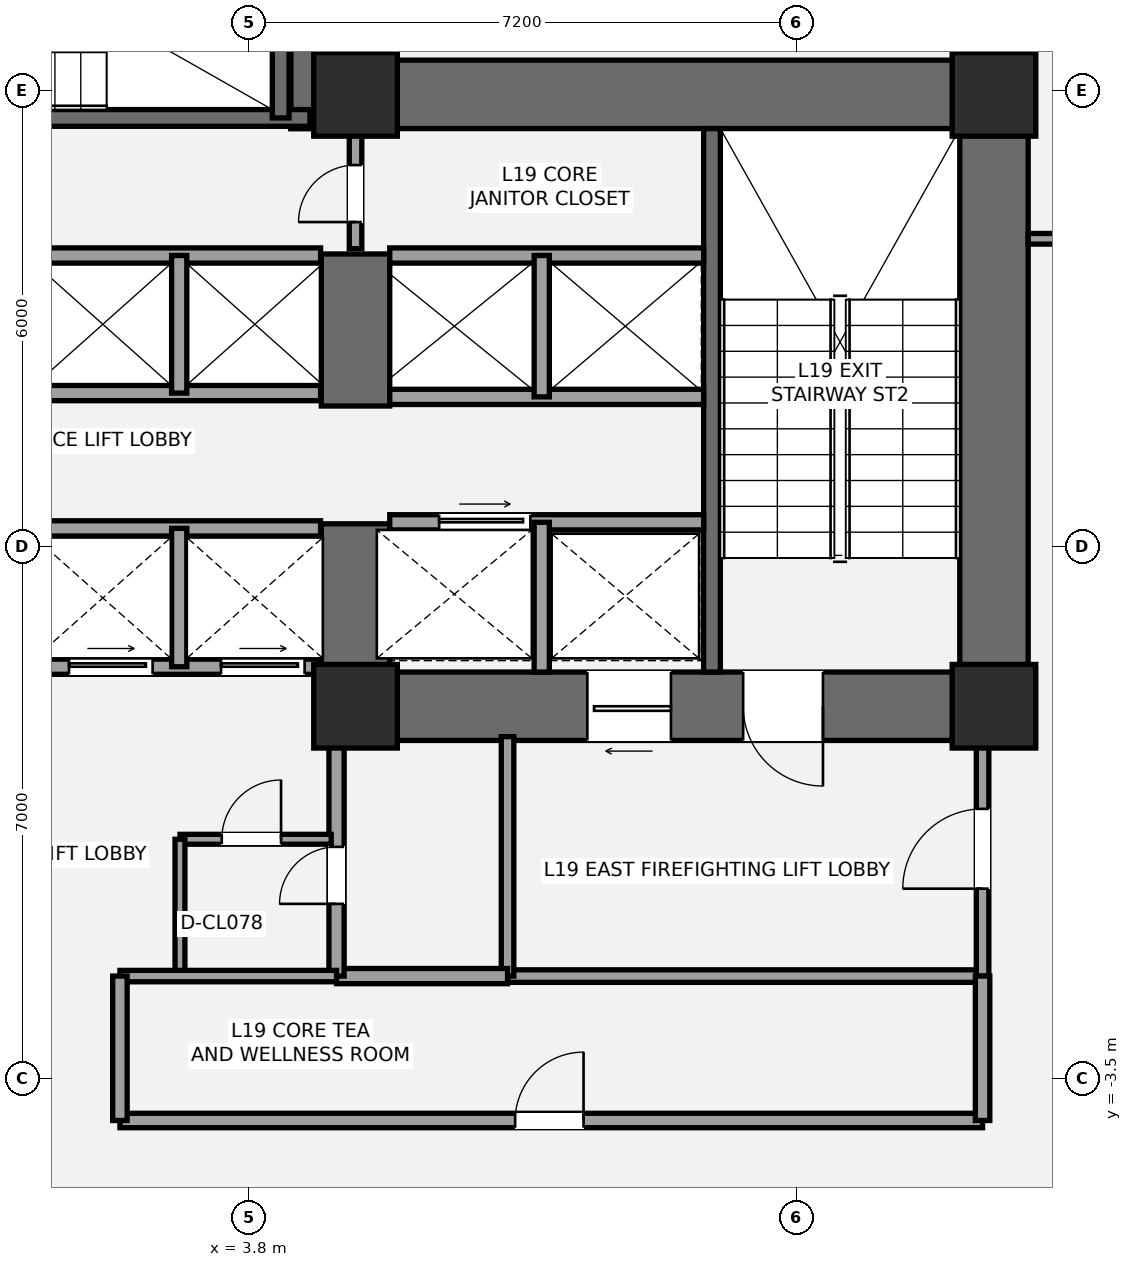
"""IFC4 building model, lengths in metres.
Left out: names, types, materials, properties, quantities, classifications, styles, units other than length and angle.
Written with IfcOpenShell. Run it as: python <this file> out.ifc"""

import sys

from ifc_helpers import new_model, si_unit, direction, frame, frame_2d, origin, origin_2d, place, context, subcontext, project, spatial, rectangle, extrude, element, fill, save


model = new_model("IFC4")
c1 = context("Model", 3, precision=1e-05, world=origin(), true_north=direction((0.0, 1.0)))
c2 = subcontext(c1, "Body", "Model", "MODEL_VIEW")
j1 = project(units=[si_unit("LENGTHUNIT", "METRE"), si_unit("PLANEANGLEUNIT", "RADIAN")], contexts=[c1])
p1 = place(None, origin())
s1 = spatial("IfcSite", under=j1, at=p1, CompositionType="ELEMENT")
p2 = place(p1, origin())
s2 = spatial("IfcBuilding", under=s1, at=p2, CompositionType="ELEMENT")
p3 = place(p2, frame((0.0, 0.0, 73.8)))
s3 = spatial("IfcBuildingStorey", under=s2, at=p3, CompositionType="ELEMENT", Elevation=73.8)
p4 = place(p3, frame((13.6, 0.95, 0.0), z_axis=(0.0, 0.0, 1.0), x_axis=(0.0, 1.0, 0.0)))
e1 = element("IfcWall", 1, at=p4, inside=s3, PredefinedType="SHEAR", context=c2, shape_type="SweptSolid", body=[
    extrude(rectangle(XDim=8.95, YDim=0.9, at=frame_2d((4.475, 0.0))), origin(), (0.0, 0.0, 1.0), 3.6),
])
p5 = place(p3, frame((4.35, 9.45, 0.0), z_axis=(0.0, 0.0, 1.0), x_axis=(1.0, 0.0, 0.0)))
e2 = element("IfcWall", 2, at=p5, inside=s3, PredefinedType="SHEAR", context=c2, shape_type="SweptSolid", body=[
    extrude(rectangle(XDim=9.7, YDim=0.9, at=frame_2d((4.85, 0.0))), origin(), (0.0, 0.0, 1.0), 3.6),
])
p6 = place(p3, frame((14.05, 1.4, 0.0), z_axis=(0.0, 0.0, 1.0), x_axis=(-1.0, 0.0, 0.0)))
e3 = element("IfcWall", 3, at=p6, inside=s3, PredefinedType="SHEAR", context=c2, shape_type="SweptSolid", body=[
    extrude(rectangle(XDim=9.3, YDim=0.9, at=frame_2d((4.65, 0.0))), origin(), (0.0, 0.0, 1.0), 3.6),
])
p7 = place(p6, frame((2.7, 0.0, 0.0)))
e4 = element("IfcOpeningElement", 4, at=p7, cuts=e3, PredefinedType="OPENING", context=c2, shape_type="SweptSolid", body=[
    extrude(rectangle(XDim=1.05, YDim=2.15, at=frame_2d((0.525, 1.075))), frame((0.0, 0.46, 0.0), z_axis=(0.0, -1.0, 0.0), x_axis=(1.0, 0.0, 0.0)), (0.0, 0.0, 1.0), 0.92),
])
p8 = place(p6, frame((4.7, 0.0, 0.0)))
e5 = element("IfcOpeningElement", 5, at=p8, cuts=e3, PredefinedType="OPENING", context=c2, shape_type="SweptSolid", body=[
    extrude(rectangle(XDim=1.1, YDim=2.2, at=frame_2d((0.55, 1.1))), frame((0.0, 0.46, 0.0), z_axis=(0.0, -1.0, 0.0), x_axis=(1.0, 0.0, 0.0)), (0.0, 0.0, 1.0), 0.92),
])
p9 = place(p3, frame((5.2, 0.95, 0.0), z_axis=(0.0, 0.0, 1.0), x_axis=(0.0, 1.0, 0.0)))
e6 = element("IfcWall", 6, at=p9, inside=s3, PredefinedType="SHEAR", context=c2, shape_type="SweptSolid", body=[
    extrude(rectangle(XDim=2.85, YDim=0.9, at=frame_2d((1.425, 0.0))), origin(), (0.0, 0.0, 1.0), 3.6),
])
p10 = place(p3, frame((5.2, 5.35, 0.0), z_axis=(0.0, 0.0, 1.0), x_axis=(0.0, 1.0, 0.0)))
e7 = element("IfcWall", 7, at=p10, inside=s3, PredefinedType="SHEAR", context=c2, shape_type="SweptSolid", body=[
    extrude(rectangle(XDim=2.0, YDim=0.9, at=frame_2d((1.0, 0.0))), origin(), (0.0, 0.0, 1.0), 3.6),
])
p11 = place(p3, frame((9.89, 1.85, 0.0), z_axis=(0.0, 0.0, 1.0), x_axis=(0.0, 1.0, 0.0)))
e8 = element("IfcWall", 8, at=p11, inside=s3, PredefinedType="SHEAR", context=c2, shape_type="SweptSolid", body=[
    extrude(rectangle(XDim=7.15, YDim=0.22, at=frame_2d((3.575, 0.0))), origin(), (0.0, 0.0, 1.0), 3.6),
])
p12 = place(p3, frame((4.8, 9.0, 0.0), z_axis=(0.0, 0.0, 1.0), x_axis=(0.0, 1.0, 0.0)))
e9 = element("IfcWall", 9, at=p12, inside=s3, PredefinedType="SHEAR", context=c2, shape_type="SweptSolid", body=[
    extrude(rectangle(XDim=4.3, YDim=0.9, at=frame_2d((2.15, 0.0))), origin(), (0.0, 0.0, 1.0), 3.6),
])
p13 = place(p3, frame((-4.7, 9.14, 0.0), z_axis=(0.0, 0.0, 1.0), x_axis=(1.0, 0.0, 0.0)))
e10 = element("IfcWall", 10, at=p13, inside=s3, PredefinedType="SHEAR", context=c2, shape_type="SweptSolid", body=[
    extrude(rectangle(XDim=9.3, YDim=0.22, at=frame_2d((4.65, 0.0))), origin(), (0.0, 0.0, 1.0), 3.6),
])
p14 = place(p13, frame((1.15, 0.0, 0.0)))
e11 = element("IfcOpeningElement", 11, at=p14, cuts=e10, PredefinedType="OPENING", context=c2, shape_type="SweptSolid", body=[
    extrude(rectangle(XDim=1.05, YDim=2.15, at=frame_2d((0.525, 1.075))), frame((0.0, 0.12, 0.0), z_axis=(0.0, -1.0, 0.0), x_axis=(1.0, 0.0, 0.0)), (0.0, 0.0, 1.0), 0.24),
])
p15 = place(p3, frame((4.215, 9.14, 0.0), z_axis=(0.0, 0.0, 1.0), x_axis=(0.0, 1.0, 0.0)))
e12 = element("IfcWall", 12, at=p15, inside=s3, PredefinedType="SHEAR", context=c2, shape_type="SweptSolid", body=[
    extrude(rectangle(XDim=3.26, YDim=0.22, at=frame_2d((1.63, 0.0))), origin(), (0.0, 0.0, 1.0), 3.6),
])
for number, where, z_axis, x_axis in (
    (13, (5.2, 1.4, 0.0), (0.0, 0.0, 1.0), (1.0, 0.0, 0.0)),
    (14, (5.2, 9.45, 0.0), (0.0, 0.0, 1.0), (1.0, 0.0, 0.0)),
    (15, (13.6, 1.4, 0.0), (0.0, 0.0, 1.0), (1.0, 0.0, 0.0)),
    (16, (13.6, 9.45, 0.0), (0.0, 0.0, 1.0), (1.0, 0.0, 0.0)),
):
    element("IfcColumn", number, at=place(p3, frame(where, z_axis=z_axis, x_axis=x_axis)), inside=s3, PredefinedType="COLUMN", context=c2, shape_type="SweptSolid", body=[
        extrude(rectangle(XDim=1.1, YDim=1.1, at=origin_2d()), origin(), (0.0, 0.0, 1.0), 3.6),
    ])
p16 = place(p3, frame((7.2, -2.15, 0.0), z_axis=(0.0, 0.0, 1.0), x_axis=(1.0, 0.0, 0.0)))
e17 = element("IfcWall", 17, at=p16, inside=s3, PredefinedType="PARTITIONING", context=c2, shape_type="SweptSolid", body=[
    extrude(rectangle(XDim=6.25, YDim=0.165, at=frame_2d((3.125, 0.0))), origin(), (0.0, 0.0, 1.0), 3.36),
])
p17 = place(p3, frame((7.2, -2.15, 0.0), z_axis=(0.0, 0.0, 1.0), x_axis=(0.0, 1.0, 0.0)))
e18 = element("IfcWall", 18, at=p17, inside=s3, PredefinedType="PARTITIONING", context=c2, shape_type="SweptSolid", body=[
    extrude(rectangle(XDim=3.15, YDim=0.165, at=frame_2d((1.575, 0.0))), origin(), (0.0, 0.0, 1.0), 3.36),
])
p18 = place(p3, frame((13.45, -2.15, 0.0), z_axis=(0.0, 0.0, 1.0), x_axis=(0.0, 1.0, 0.0)))
e19 = element("IfcWall", 19, at=p18, inside=s3, PredefinedType="PARTITIONING", context=c2, shape_type="SweptSolid", body=[
    extrude(rectangle(XDim=3.15, YDim=0.165, at=frame_2d((1.575, 0.0))), origin(), (0.0, 0.0, 1.0), 2.813),
])
p19 = place(p18, frame((1.15, 0.0, 0.0)))
e20 = element("IfcOpeningElement", 20, at=p19, cuts=e19, PredefinedType="OPENING", context=c2, shape_type="SweptSolid", body=[
    extrude(rectangle(XDim=1.05, YDim=2.15, at=frame_2d((0.525, 1.075))), frame((0.0, 0.093, 0.0), z_axis=(0.0, -1.0, 0.0), x_axis=(1.0, 0.0, 0.0)), (0.0, 0.0, 1.0), 0.185),
])
p20 = place(p3, frame((4.95, -2.15, 0.0), z_axis=(0.0, 0.0, 1.0), x_axis=(1.0, 0.0, 0.0)))
e21 = element("IfcWall", 21, at=p20, inside=s3, PredefinedType="SOLIDWALL", context=c2, shape_type="SweptSolid", body=[
    extrude(rectangle(XDim=2.25, YDim=0.2, at=frame_2d((1.125, 0.0))), origin(), (0.0, 0.0, 1.0), 3.36),
])
p21 = place(p3, frame((4.95, -2.15, 0.0), z_axis=(0.0, 0.0, 1.0), x_axis=(0.0, 1.0, 0.0)))
e22 = element("IfcWall", 22, at=p21, inside=s3, PredefinedType="SOLIDWALL", context=c2, shape_type="SweptSolid", body=[
    extrude(rectangle(XDim=3.15, YDim=0.2, at=frame_2d((1.575, 0.0))), origin(), (0.0, 0.0, 1.0), 2.813),
])
p22 = place(p21, frame((0.95, 0.0, 0.0)))
e23 = element("IfcOpeningElement", 23, at=p22, cuts=e22, PredefinedType="OPENING", context=c2, shape_type="SweptSolid", body=[
    extrude(rectangle(XDim=0.75, YDim=2.1, at=frame_2d((0.375, 1.05))), frame((0.0, 0.11, 0.0), z_axis=(0.0, -1.0, 0.0), x_axis=(1.0, 0.0, 0.0)), (0.0, 0.0, 1.0), 0.22),
])
p23 = place(p3, frame((2.89, -0.35, 0.0), z_axis=(0.0, 0.0, 1.0), x_axis=(1.0, 0.0, 0.0)))
e24 = element("IfcWall", 24, at=p23, inside=s3, PredefinedType="PARTITIONING", context=c2, shape_type="SweptSolid", body=[
    extrude(rectangle(XDim=1.99, YDim=0.13, at=frame_2d((0.995, 0.0))), origin(), (0.0, 0.0, 1.0), 3.36),
])
p24 = place(p23, frame((0.55, 0.0, 0.0)))
e25 = element("IfcOpeningElement", 25, at=p24, cuts=e24, PredefinedType="OPENING", context=c2, shape_type="SweptSolid", body=[
    extrude(rectangle(XDim=0.78, YDim=2.1, at=frame_2d((0.39, 1.05))), frame((0.0, 0.075, 0.0), z_axis=(0.0, -1.0, 0.0), x_axis=(1.0, 0.0, 0.0)), (0.0, 0.0, 1.0), 0.15),
])
p25 = place(p3, frame((2.89, -2.15, 0.0), z_axis=(0.0, 0.0, 1.0), x_axis=(0.0, 1.0, 0.0)))
e26 = element("IfcWall", 26, at=p25, inside=s3, PredefinedType="PARTITIONING", context=c2, shape_type="SweptSolid", body=[
    extrude(rectangle(XDim=1.8, YDim=0.13, at=frame_2d((0.9, 0.0))), origin(), (0.0, 0.0, 1.0), 3.36),
])
p26 = place(p3, frame((5.65, 3.82, 0.0), z_axis=(0.0, 0.0, 1.0), x_axis=(1.0, 0.0, 0.0)))
e27 = element("IfcWall", 27, at=p26, inside=s3, PredefinedType="SOLIDWALL", context=c2, shape_type="SweptSolid", body=[
    extrude(rectangle(XDim=4.13, YDim=0.2, at=frame_2d((2.065, 0.0))), origin(), (0.0, 0.0, 1.0), 3.36),
])
p27 = place(p26, frame((0.65, 0.0, 0.0)))
e28 = element("IfcOpeningElement", 28, at=p27, cuts=e27, PredefinedType="OPENING", context=c2, shape_type="SweptSolid", body=[
    extrude(rectangle(XDim=1.2, YDim=2.2, at=frame_2d((0.6, 1.1))), frame((0.0, 0.11, 0.0), z_axis=(0.0, -1.0, 0.0), x_axis=(1.0, 0.0, 0.0)), (0.0, 0.0, 1.0), 0.22),
])
p28 = place(p3, frame((7.65, 1.85, 0.0), z_axis=(0.0, 0.0, 1.0), x_axis=(0.0, 1.0, 0.0)))
e29 = element("IfcWall", 29, at=p28, inside=s3, PredefinedType="SOLIDWALL", context=c2, shape_type="SweptSolid", body=[
    extrude(rectangle(XDim=1.97, YDim=0.2, at=frame_2d((0.985, 0.0))), origin(), (0.0, 0.0, 1.0), 3.36),
])
for number, where, z_axis, x_axis in (
    (30, (5.65, 5.47, 0.0), (0.0, 0.0, 1.0), (1.0, 0.0, 0.0)),
    (31, (5.65, 7.33, 0.0), (0.0, 0.0, 1.0), (1.0, 0.0, 0.0)),
):
    element("IfcWall", number, at=place(p3, frame(where, z_axis=z_axis, x_axis=x_axis)), inside=s3, PredefinedType="SOLIDWALL", context=c2, shape_type="SweptSolid", body=[
        extrude(rectangle(XDim=4.13, YDim=0.2, at=frame_2d((2.065, 0.0))), origin(), (0.0, 0.0, 1.0), 3.36),
    ])
p29 = place(p3, frame((7.65, 5.47, 0.0), z_axis=(0.0, 0.0, 1.0), x_axis=(0.0, 1.0, 0.0)))
e32 = element("IfcWall", 32, at=p29, inside=s3, PredefinedType="SOLIDWALL", context=c2, shape_type="SweptSolid", body=[
    extrude(rectangle(XDim=1.86, YDim=0.2, at=frame_2d((0.93, 0.0))), origin(), (0.0, 0.0, 1.0), 3.36),
])
p30 = place(p3, frame((0.88, 1.92, 0.0), z_axis=(0.0, 0.0, 1.0), x_axis=(1.0, 0.0, 0.0)))
e33 = element("IfcWall", 33, at=p30, inside=s3, PredefinedType="SOLIDWALL", context=c2, shape_type="SweptSolid", body=[
    extrude(rectangle(XDim=3.86, YDim=0.2, at=frame_2d((1.93, 0.0))), origin(), (0.0, 0.0, 1.0), 2.35),
])
p31 = place(p30, frame((0.55, 0.0, 0.0)))
e34 = element("IfcOpeningElement", 34, at=p31, cuts=e33, PredefinedType="OPENING", context=c2, shape_type="SweptSolid", body=[
    extrude(rectangle(XDim=1.1, YDim=2.2, at=frame_2d((0.55, 1.1))), frame((0.0, 0.11, 0.0), z_axis=(0.0, -1.0, 0.0), x_axis=(1.0, 0.0, 0.0)), (0.0, 0.0, 1.0), 0.22),
])
p32 = place(p30, frame((2.55, 0.0, 0.0)))
e35 = element("IfcOpeningElement", 35, at=p32, cuts=e33, PredefinedType="OPENING", context=c2, shape_type="SweptSolid", body=[
    extrude(rectangle(XDim=1.1, YDim=2.2, at=frame_2d((0.55, 1.1))), frame((0.0, 0.11, 0.0), z_axis=(0.0, -1.0, 0.0), x_axis=(1.0, 0.0, 0.0)), (0.0, 0.0, 1.0), 0.22),
])
p33 = place(p3, frame((0.88, 3.74, 0.0), z_axis=(0.0, 0.0, 1.0), x_axis=(1.0, 0.0, 0.0)))
e36 = element("IfcWall", 36, at=p33, inside=s3, PredefinedType="SOLIDWALL", context=c2, shape_type="SweptSolid", body=[
    extrude(rectangle(XDim=3.86, YDim=0.2, at=frame_2d((1.93, 0.0))), origin(), (0.0, 0.0, 1.0), 3.36),
])
p34 = place(p3, frame((2.88, 1.92, 0.0), z_axis=(0.0, 0.0, 1.0), x_axis=(0.0, 1.0, 0.0)))
e37 = element("IfcWall", 37, at=p34, inside=s3, PredefinedType="SOLIDWALL", context=c2, shape_type="SweptSolid", body=[
    extrude(rectangle(XDim=1.82, YDim=0.2, at=frame_2d((0.91, 0.0))), origin(), (0.0, 0.0, 1.0), 3.36),
])
for number, where, z_axis, x_axis in (
    (38, (0.88, 5.52, 0.0), (0.0, 0.0, 1.0), (1.0, 0.0, 0.0)),
    (39, (0.88, 7.33, 0.0), (0.0, 0.0, 1.0), (1.0, 0.0, 0.0)),
):
    element("IfcWall", number, at=place(p3, frame(where, z_axis=z_axis, x_axis=x_axis)), inside=s3, PredefinedType="SOLIDWALL", context=c2, shape_type="SweptSolid", body=[
        extrude(rectangle(XDim=3.86, YDim=0.2, at=frame_2d((1.93, 0.0))), origin(), (0.0, 0.0, 1.0), 3.36),
    ])
p35 = place(p3, frame((2.88, 5.52, 0.0), z_axis=(0.0, 0.0, 1.0), x_axis=(0.0, 1.0, 0.0)))
e40 = element("IfcWall", 40, at=p35, inside=s3, PredefinedType="SOLIDWALL", context=c2, shape_type="SweptSolid", body=[
    extrude(rectangle(XDim=1.81, YDim=0.2, at=frame_2d((0.905, 0.0))), origin(), (0.0, 0.0, 1.0), 3.36),
])
p36 = place(p3, frame((5.2, 7.42, 0.0), z_axis=(0.0, 0.0, 1.0), x_axis=(0.0, 1.0, 0.0)))
e41 = element("IfcWall", 41, at=p36, inside=s3, PredefinedType="PARTITIONING", context=c2, shape_type="SweptSolid", body=[
    extrude(rectangle(XDim=1.58, YDim=0.165, at=frame_2d((0.79, 0.0))), origin(), (0.0, 0.0, 1.0), 3.36),
])
p37 = place(p36, frame((0.35, 0.0, 0.0)))
e42 = element("IfcOpeningElement", 42, at=p37, cuts=e41, PredefinedType="OPENING", context=c2, shape_type="SweptSolid", body=[
    extrude(rectangle(XDim=0.75, YDim=2.1, at=frame_2d((0.375, 1.05))), frame((0.0, 0.093, 0.0), z_axis=(0.0, -1.0, 0.0), x_axis=(1.0, 0.0, 0.0)), (0.0, 0.0, 1.0), 0.185),
])
p38 = place(p3, frame((2.1, -4.05, 0.0), z_axis=(0.0, 0.0, 1.0), x_axis=(1.0, 0.0, 0.0)))
e43 = element("IfcWall", 43, at=p38, inside=s3, PredefinedType="PLUMBINGWALL", context=c2, shape_type="SweptSolid", body=[
    extrude(rectangle(XDim=11.35, YDim=0.19, at=frame_2d((5.675, 0.0))), origin(), (0.0, 0.0, 1.0), 2.893),
])
p39 = place(p38, frame((5.2, 0.0, 0.0)))
e44 = element("IfcOpeningElement", 44, at=p39, cuts=e43, PredefinedType="OPENING", context=c2, shape_type="SweptSolid", body=[
    extrude(rectangle(XDim=0.9, YDim=2.1, at=frame_2d((0.45, 1.05))), frame((0.0, 0.105, 0.0), z_axis=(0.0, -1.0, 0.0), x_axis=(1.0, 0.0, 0.0)), (0.0, 0.0, 1.0), 0.21),
])
p40 = place(p3, frame((2.1, -2.15, 0.0), z_axis=(0.0, 0.0, 1.0), x_axis=(1.0, 0.0, 0.0)))
e45 = element("IfcWall", 45, at=p40, inside=s3, PredefinedType="PLUMBINGWALL", context=c2, shape_type="SweptSolid", body=[
    extrude(rectangle(XDim=2.85, YDim=0.15, at=frame_2d((1.425, 0.0))), origin(), (0.0, 0.0, 1.0), 3.36),
])
p41 = place(p3, frame((2.1, -4.05, 0.0), z_axis=(0.0, 0.0, 1.0), x_axis=(0.0, 1.0, 0.0)))
e46 = element("IfcWall", 46, at=p41, inside=s3, PredefinedType="PLUMBINGWALL", context=c2, shape_type="SweptSolid", body=[
    extrude(rectangle(XDim=1.9, YDim=0.19, at=frame_2d((0.95, 0.0))), origin(), (0.0, 0.0, 1.0), 3.36),
])
p42 = place(p3, frame((13.45, -4.05, 0.0), z_axis=(0.0, 0.0, 1.0), x_axis=(0.0, 1.0, 0.0)))
e47 = element("IfcWall", 47, at=p42, inside=s3, PredefinedType="PLUMBINGWALL", context=c2, shape_type="SweptSolid", body=[
    extrude(rectangle(XDim=1.9, YDim=0.19, at=frame_2d((0.95, 0.0))), origin(), (0.0, 0.0, 1.0), 2.813),
])
p43 = place(p3, frame((14.05, 7.55, 0.0), z_axis=(0.0, 0.0, 1.0), x_axis=(1.0, 0.0, 0.0)))
e48 = element("IfcWall", 48, at=p43, inside=s3, PredefinedType="PARTITIONING", context=c2, shape_type="SweptSolid", body=[
    extrude(rectangle(XDim=12.198, YDim=0.14, at=frame_2d((6.099, 0.0))), origin(), (0.0, 0.0, 1.0), 2.813),
])
p44 = place(p43, frame((1.2, 0.0, 0.0)))
e49 = element("IfcOpeningElement", 49, at=p44, cuts=e48, PredefinedType="OPENING", context=c2, shape_type="SweptSolid", body=[
    extrude(rectangle(XDim=0.92, YDim=2.15, at=frame_2d((0.46, 1.075))), frame((0.0, 0.08, 0.0), z_axis=(0.0, -1.0, 0.0), x_axis=(1.0, 0.0, 0.0)), (0.0, 0.0, 1.0), 0.16),
])
p45 = place(p7, origin())
e50 = element("IfcDoor", 50, at=p45, inside=s3, OperationType="SINGLE_SWING_LEFT", PredefinedType="DOOR", context=c2, shape_type="SweptSolid", body=[
    extrude(rectangle(XDim=1.05, YDim=2.15, at=frame_2d((0.525, 1.075))), frame((0.0, 0.025, 0.0), z_axis=(0.0, -1.0, 0.0), x_axis=(1.0, 0.0, 0.0)), (0.0, 0.0, 1.0), 0.05),
])
fill(e4, e50)
p46 = place(p19, origin())
e51 = element("IfcDoor", 51, at=p46, inside=s3, OperationType="SINGLE_SWING_LEFT", PredefinedType="DOOR", context=c2, shape_type="SweptSolid", body=[
    extrude(rectangle(XDim=1.05, YDim=2.15, at=frame_2d((0.525, 1.075))), frame((0.0, 0.025, 0.0), z_axis=(0.0, -1.0, 0.0), x_axis=(1.0, 0.0, 0.0)), (0.0, 0.0, 1.0), 0.05),
])
fill(e20, e51)
p47 = place(p22, origin())
e52 = element("IfcDoor", 52, at=p47, inside=s3, OperationType="SINGLE_SWING_LEFT", PredefinedType="DOOR", context=c2, shape_type="SweptSolid", body=[
    extrude(rectangle(XDim=0.75, YDim=2.1, at=frame_2d((0.375, 1.05))), frame((0.0, 0.025, 0.0), z_axis=(0.0, -1.0, 0.0), x_axis=(1.0, 0.0, 0.0)), (0.0, 0.0, 1.0), 0.05),
])
fill(e23, e52)
p48 = place(p24, origin())
e53 = element("IfcDoor", 53, at=p48, inside=s3, OperationType="SINGLE_SWING_RIGHT", PredefinedType="DOOR", context=c2, shape_type="SweptSolid", body=[
    extrude(rectangle(XDim=0.78, YDim=2.1, at=frame_2d((0.39, 1.05))), frame((0.0, 0.025, 0.0), z_axis=(0.0, -1.0, 0.0), x_axis=(1.0, 0.0, 0.0)), (0.0, 0.0, 1.0), 0.05),
])
fill(e25, e53)
p49 = place(p8, origin())
e54 = element("IfcDoor", 54, at=p49, inside=s3, OperationType="SLIDING_TO_LEFT", PredefinedType="DOOR", context=c2, shape_type="SweptSolid", body=[
    extrude(rectangle(XDim=1.1, YDim=2.2, at=frame_2d((0.55, 1.1))), frame((0.0, 0.025, 0.0), z_axis=(0.0, -1.0, 0.0), x_axis=(1.0, 0.0, 0.0)), (0.0, 0.0, 1.0), 0.05),
])
fill(e5, e54)
p50 = place(p27, origin())
e55 = element("IfcDoor", 55, at=p50, inside=s3, OperationType="SLIDING_TO_RIGHT", PredefinedType="DOOR", context=c2, shape_type="SweptSolid", body=[
    extrude(rectangle(XDim=1.2, YDim=2.2, at=frame_2d((0.6, 1.1))), frame((0.0, 0.025, 0.0), z_axis=(0.0, -1.0, 0.0), x_axis=(1.0, 0.0, 0.0)), (0.0, 0.0, 1.0), 0.05),
])
fill(e28, e55)
p51 = place(p31, origin())
e56 = element("IfcDoor", 56, at=p51, inside=s3, OperationType="SLIDING_TO_LEFT", PredefinedType="DOOR", context=c2, shape_type="SweptSolid", body=[
    extrude(rectangle(XDim=1.1, YDim=2.2, at=frame_2d((0.55, 1.1))), frame((0.0, 0.025, 0.0), z_axis=(0.0, -1.0, 0.0), x_axis=(1.0, 0.0, 0.0)), (0.0, 0.0, 1.0), 0.05),
])
fill(e34, e56)
p52 = place(p32, origin())
e57 = element("IfcDoor", 57, at=p52, inside=s3, OperationType="SLIDING_TO_LEFT", PredefinedType="DOOR", context=c2, shape_type="SweptSolid", body=[
    extrude(rectangle(XDim=1.1, YDim=2.2, at=frame_2d((0.55, 1.1))), frame((0.0, 0.025, 0.0), z_axis=(0.0, -1.0, 0.0), x_axis=(1.0, 0.0, 0.0)), (0.0, 0.0, 1.0), 0.05),
])
fill(e35, e57)
p53 = place(p37, origin())
e58 = element("IfcDoor", 58, at=p53, inside=s3, OperationType="SINGLE_SWING_LEFT", PredefinedType="DOOR", context=c2, shape_type="SweptSolid", body=[
    extrude(rectangle(XDim=0.75, YDim=2.1, at=frame_2d((0.375, 1.05))), frame((0.0, 0.025, 0.0), z_axis=(0.0, -1.0, 0.0), x_axis=(1.0, 0.0, 0.0)), (0.0, 0.0, 1.0), 0.05),
])
fill(e42, e58)
p54 = place(p39, origin())
e59 = element("IfcDoor", 59, at=p54, inside=s3, OperationType="SINGLE_SWING_RIGHT", PredefinedType="DOOR", context=c2, shape_type="SweptSolid", body=[
    extrude(rectangle(XDim=0.9, YDim=2.1, at=frame_2d((0.45, 1.05))), frame((0.0, 0.025, 0.0), z_axis=(0.0, -1.0, 0.0), x_axis=(1.0, 0.0, 0.0)), (0.0, 0.0, 1.0), 0.05),
])
fill(e44, e59)
save(model, sys.argv[1])
